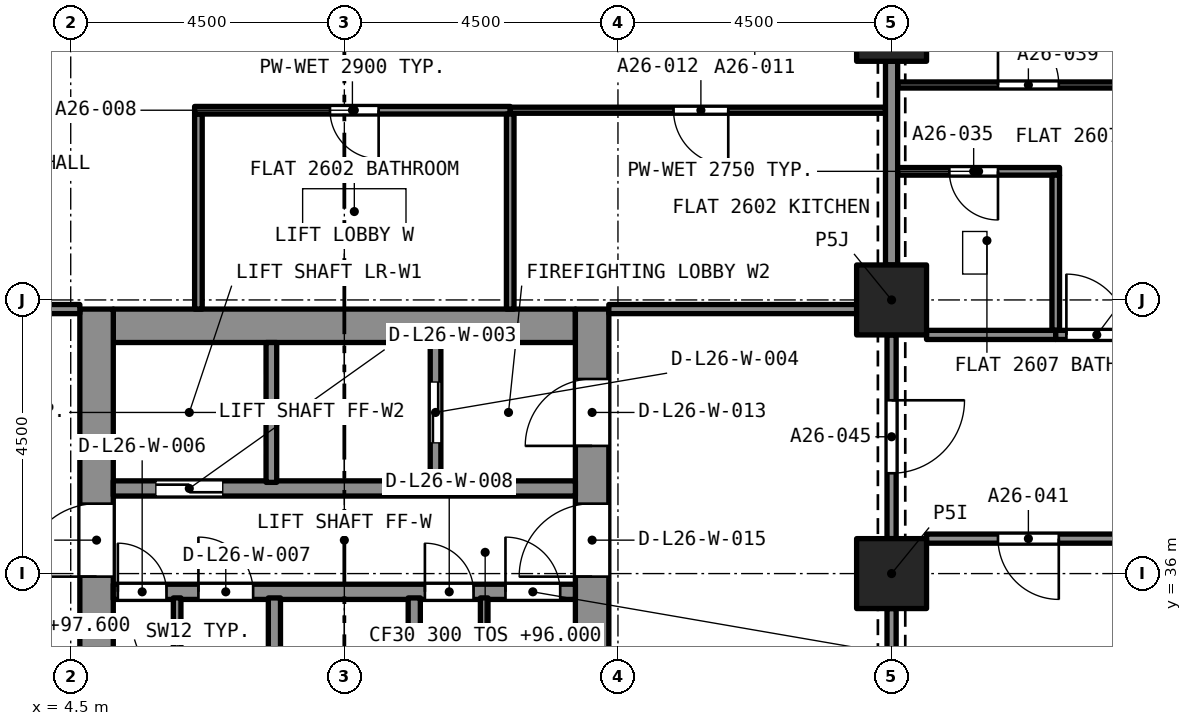
"""IFC4 building model, lengths in metres.
Left out: names, types, materials, properties, quantities, classifications, styles, units other than length and angle.
Written with IfcOpenShell. Run it as: python <this file> out.ifc"""

import sys

from ifc_helpers import new_model, si_unit, direction, frame, frame_2d, origin, origin_2d, place, context, subcontext, project, spatial, rectangle, extrude, element, fill, save


model = new_model("IFC4")
c1 = context("Model", 3, precision=1e-05, world=origin(), true_north=direction((0.0, 1.0)))
c2 = subcontext(c1, "Body", "Model", "MODEL_VIEW")
j1 = project(units=[si_unit("LENGTHUNIT", "METRE"), si_unit("PLANEANGLEUNIT", "RADIAN")], contexts=[c1])
p1 = place(None, origin())
s1 = spatial("IfcSite", under=j1, at=p1, CompositionType="ELEMENT")
p2 = place(p1, origin())
s2 = spatial("IfcBuilding", under=s1, at=p2, CompositionType="ELEMENT")
p3 = place(p2, frame((0.0, 0.0, 96.0)))
s3 = spatial("IfcBuildingStorey", under=s2, at=p3, CompositionType="ELEMENT", Elevation=96.0)
for number, where, z_axis, x_axis in (
    (1, (18.0, 36.0, 0.0), (0.0, 0.0, 1.0), (1.0, 0.0, 0.0)),
    (2, (18.0, 40.5, 0.0), (0.0, 0.0, 1.0), (1.0, 0.0, 0.0)),
    (3, (18.0, 45.0, 0.0), (0.0, 0.0, 1.0), (1.0, 0.0, 0.0)),
):
    element("IfcColumn", number, at=place(p3, frame(where, z_axis=z_axis, x_axis=x_axis)), inside=s3, PredefinedType="COLUMN", context=c2, shape_type="SweptSolid", body=[
        extrude(rectangle(XDim=1.15, YDim=1.15, at=origin_2d()), origin(), (0.0, 0.0, 1.0), 3.2),
    ])
p4 = place(p3, frame((5.2, 40.075, 0.0), z_axis=(0.0, 0.0, 1.0), x_axis=(1.0, 0.0, 0.0)))
e4 = element("IfcWall", 4, at=p4, inside=s3, PredefinedType="SOLIDWALL", context=c2, shape_type="SweptSolid", body=[
    extrude(rectangle(XDim=7.6, YDim=0.55, at=frame_2d((3.8, 0.0))), origin(), (0.0, 0.0, 1.0), 3.2),
])
p5 = place(p3, frame((4.925, 27.15, 0.0), z_axis=(0.0, 0.0, 1.0), x_axis=(0.0, 1.0, 0.0)))
e5 = element("IfcWall", 5, at=p5, inside=s3, PredefinedType="SOLIDWALL", context=c2, shape_type="SweptSolid", body=[
    extrude(rectangle(XDim=13.2, YDim=0.55, at=frame_2d((6.6, 0.0))), origin(), (0.0, 0.0, 1.0), 3.2),
])
p6 = place(p5, frame((8.8, 0.0, 0.0)))
e6 = element("IfcOpeningElement", 6, at=p6, cuts=e5, PredefinedType="OPENING", context=c2, shape_type="SweptSolid", body=[
    extrude(rectangle(XDim=1.2, YDim=2.1, at=frame_2d((0.6, 1.05))), frame((0.0, 0.285, 0.0), z_axis=(0.0, -1.0, 0.0), x_axis=(1.0, 0.0, 0.0)), (0.0, 0.0, 1.0), 0.57),
])
p7 = place(p3, frame((13.075, 27.15, 0.0), z_axis=(0.0, 0.0, 1.0), x_axis=(0.0, 1.0, 0.0)))
e7 = element("IfcWall", 7, at=p7, inside=s3, PredefinedType="SOLIDWALL", context=c2, shape_type="SweptSolid", body=[
    extrude(rectangle(XDim=13.2, YDim=0.55, at=frame_2d((6.6, 0.0))), origin(), (0.0, 0.0, 1.0), 3.2),
])
p8 = place(p7, frame((10.95, 0.0, 0.0)))
e8 = element("IfcOpeningElement", 8, at=p8, cuts=e7, PredefinedType="OPENING", context=c2, shape_type="SweptSolid", body=[
    extrude(rectangle(XDim=1.1, YDim=2.1, at=frame_2d((0.55, 1.05))), frame((0.0, 0.285, 0.0), z_axis=(0.0, -1.0, 0.0), x_axis=(1.0, 0.0, 0.0)), (0.0, 0.0, 1.0), 0.57),
])
p9 = place(p7, frame((8.8, 0.0, 0.0)))
e9 = element("IfcOpeningElement", 9, at=p9, cuts=e7, PredefinedType="OPENING", context=c2, shape_type="SweptSolid", body=[
    extrude(rectangle(XDim=1.2, YDim=2.1, at=frame_2d((0.6, 1.05))), frame((0.0, 0.285, 0.0), z_axis=(0.0, -1.0, 0.0), x_axis=(1.0, 0.0, 0.0)), (0.0, 0.0, 1.0), 0.57),
])
p10 = place(p3, frame((6.6, 40.35, 0.0), z_axis=(0.0, 0.0, 1.0), x_axis=(0.0, 1.0, 0.0)))
e10 = element("IfcWall", 10, at=p10, inside=s3, PredefinedType="PARTITIONING", context=c2, shape_type="SweptSolid", body=[
    extrude(rectangle(XDim=3.208, YDim=0.125, at=frame_2d((1.604, 0.0))), origin(), (0.0, 0.0, 1.0), 2.9),
])
p11 = place(p3, frame((11.728, 43.62, 0.0), z_axis=(0.0, 0.0, 1.0), x_axis=(-1.0, 0.0, 0.0)))
e11 = element("IfcWall", 11, at=p11, inside=s3, PredefinedType="PARTITIONING", context=c2, shape_type="SweptSolid", body=[
    extrude(rectangle(XDim=5.19, YDim=0.125, at=frame_2d((2.595, 0.0))), origin(), (0.0, 0.0, 1.0), 2.9),
])
p12 = place(p11, frame((2.164, 0.0, 0.0)))
e12 = element("IfcOpeningElement", 12, at=p12, cuts=e11, PredefinedType="OPENING", context=c2, shape_type="SweptSolid", body=[
    extrude(rectangle(XDim=0.8, YDim=2.1, at=frame_2d((0.4, 1.05))), frame((0.0, 0.073, 0.0), z_axis=(0.0, -1.0, 0.0), x_axis=(1.0, 0.0, 0.0)), (0.0, 0.0, 1.0), 0.145),
])
p13 = place(p3, frame((11.728, 40.35, 0.0), z_axis=(0.0, 0.0, 1.0), x_axis=(0.0, 1.0, 0.0)))
e13 = element("IfcWall", 13, at=p13, inside=s3, PredefinedType="PARTITIONING", context=c2, shape_type="SweptSolid", body=[
    extrude(rectangle(XDim=3.208, YDim=0.125, at=frame_2d((1.604, 0.0))), origin(), (0.0, 0.0, 1.0), 2.9),
])
p14 = place(p3, frame((17.9, 43.62, 0.0), z_axis=(0.0, 0.0, 1.0), x_axis=(-1.0, 0.0, 0.0)))
e14 = element("IfcWall", 14, at=p14, inside=s3, PredefinedType="PARTITIONING", context=c2, shape_type="SweptSolid", body=[
    extrude(rectangle(XDim=6.172, YDim=0.1, at=frame_2d((3.086, 0.0))), origin(), (0.0, 0.0, 1.0), 2.9),
])
p15 = place(p14, frame((2.586, 0.0, 0.0)))
e15 = element("IfcOpeningElement", 15, at=p15, cuts=e14, PredefinedType="OPENING", context=c2, shape_type="SweptSolid", body=[
    extrude(rectangle(XDim=0.9, YDim=2.1, at=frame_2d((0.45, 1.05))), frame((0.0, 0.06, 0.0), z_axis=(0.0, -1.0, 0.0), x_axis=(1.0, 0.0, 0.0)), (0.0, 0.0, 1.0), 0.12),
])
p16 = place(p3, frame((0.575, 40.35, 0.0), z_axis=(0.0, 0.0, 1.0), x_axis=(1.0, 0.0, 0.0)))
e16 = element("IfcWall", 16, at=p16, inside=s3, PredefinedType="PARTITIONING", context=c2, shape_type="SweptSolid", body=[
    extrude(rectangle(XDim=4.075, YDim=0.15, at=frame_2d((2.038, 0.0))), origin(), (0.0, 0.0, 1.0), 2.9),
])
p17 = place(p16, frame((1.175, 0.0, 0.0)))
e17 = element("IfcOpeningElement", 17, at=p17, cuts=e16, PredefinedType="OPENING", context=c2, shape_type="SweptSolid", body=[
    extrude(rectangle(XDim=1.0, YDim=2.1, at=frame_2d((0.5, 1.05))), frame((0.0, 0.085, 0.0), z_axis=(0.0, -1.0, 0.0), x_axis=(1.0, 0.0, 0.0)), (0.0, 0.0, 1.0), 0.17),
])
p18 = place(p3, frame((18.0, 41.075, 0.0), z_axis=(0.0, 0.0, 1.0), x_axis=(0.0, 1.0, 0.0)))
e18 = element("IfcWall", 18, at=p18, inside=s3, PredefinedType="PARTITIONING", context=c2, shape_type="SweptSolid", body=[
    extrude(rectangle(XDim=3.35, YDim=0.2, at=frame_2d((1.675, 0.0))), origin(), (0.0, 0.0, 1.0), 2.38),
])
p19 = place(p3, frame((13.35, 40.35, 0.0), z_axis=(0.0, 0.0, 1.0), x_axis=(1.0, 0.0, 0.0)))
e19 = element("IfcWall", 19, at=p19, inside=s3, PredefinedType="PARTITIONING", context=c2, shape_type="SweptSolid", body=[
    extrude(rectangle(XDim=4.075, YDim=0.15, at=frame_2d((2.038, 0.0))), origin(), (0.0, 0.0, 1.0), 2.9),
])
p20 = place(p3, frame((20.762, 42.615, 0.0), z_axis=(0.0, 0.0, 1.0), x_axis=(-1.0, 0.0, 0.0)))
e20 = element("IfcWall", 20, at=p20, inside=s3, PredefinedType="PARTITIONING", context=c2, shape_type="SweptSolid", body=[
    extrude(rectangle(XDim=2.662, YDim=0.125, at=frame_2d((1.331, 0.0))), origin(), (0.0, 0.0, 1.0), 2.75),
])
p21 = place(p20, frame((1.012, 0.0, 0.0)))
e21 = element("IfcOpeningElement", 21, at=p21, cuts=e20, PredefinedType="OPENING", context=c2, shape_type="SweptSolid", body=[
    extrude(rectangle(XDim=0.8, YDim=2.1, at=frame_2d((0.4, 1.05))), frame((0.0, 0.073, 0.0), z_axis=(0.0, -1.0, 0.0), x_axis=(1.0, 0.0, 0.0)), (0.0, 0.0, 1.0), 0.145),
])
p22 = place(p3, frame((20.7, 40.0, 0.0), z_axis=(0.0, 0.0, 1.0), x_axis=(0.0, 1.0, 0.0)))
e22 = element("IfcWall", 22, at=p22, inside=s3, PredefinedType="PARTITIONING", context=c2, shape_type="SweptSolid", body=[
    extrude(rectangle(XDim=2.552, YDim=0.125, at=frame_2d((1.276, 0.0))), origin(), (0.0, 0.0, 1.0), 2.75),
])
p23 = place(p3, frame((18.575, 39.925, 0.0), z_axis=(0.0, 0.0, 1.0), x_axis=(1.0, 0.0, 0.0)))
e23 = element("IfcWall", 23, at=p23, inside=s3, PredefinedType="PARTITIONING", context=c2, shape_type="SweptSolid", body=[
    extrude(rectangle(XDim=2.125, YDim=0.15, at=frame_2d((1.062, 0.0))), origin(), (0.0, 0.0, 1.0), 2.75),
])
p24 = place(p3, frame((18.1, 44.035, 0.0), z_axis=(0.0, 0.0, 1.0), x_axis=(1.0, 0.0, 0.0)))
e24 = element("IfcWall", 24, at=p24, inside=s3, PredefinedType="PARTITIONING", context=c2, shape_type="SweptSolid", body=[
    extrude(rectangle(XDim=4.4, YDim=0.1, at=frame_2d((2.2, 0.0))), origin(), (0.0, 0.0, 1.0), 2.75),
])
p25 = place(p24, frame((1.65, 0.0, 0.0)))
e25 = element("IfcOpeningElement", 25, at=p25, cuts=e24, PredefinedType="OPENING", context=c2, shape_type="SweptSolid", body=[
    extrude(rectangle(XDim=1.0, YDim=2.1, at=frame_2d((0.5, 1.05))), frame((0.0, 0.06, 0.0), z_axis=(0.0, -1.0, 0.0), x_axis=(1.0, 0.0, 0.0)), (0.0, 0.0, 1.0), 0.12),
])
p26 = place(p3, frame((20.7, 39.925, 0.0), z_axis=(0.0, 0.0, 1.0), x_axis=(1.0, 0.0, 0.0)))
e26 = element("IfcWall", 26, at=p26, inside=s3, PredefinedType="PARTITIONING", context=c2, shape_type="SweptSolid", body=[
    extrude(rectangle(XDim=1.35, YDim=0.15, at=frame_2d((0.675, 0.0))), origin(), (0.0, 0.0, 1.0), 2.75),
])
p27 = place(p26, frame((0.175, 0.0, 0.0)))
e27 = element("IfcOpeningElement", 27, at=p27, cuts=e26, PredefinedType="OPENING", context=c2, shape_type="SweptSolid", body=[
    extrude(rectangle(XDim=1.0, YDim=2.1, at=frame_2d((0.5, 1.05))), frame((0.0, 0.085, 0.0), z_axis=(0.0, -1.0, 0.0), x_axis=(1.0, 0.0, 0.0)), (0.0, 0.0, 1.0), 0.17),
])
p28 = place(p3, frame((22.5, 36.575, 0.0), z_axis=(0.0, 0.0, 1.0), x_axis=(-1.0, 0.0, 0.0)))
e28 = element("IfcWall", 28, at=p28, inside=s3, PredefinedType="PARTITIONING", context=c2, shape_type="SweptSolid", body=[
    extrude(rectangle(XDim=3.925, YDim=0.15, at=frame_2d((1.962, 0.0))), origin(), (0.0, 0.0, 1.0), 2.75),
])
p29 = place(p28, frame((1.75, 0.0, 0.0)))
e29 = element("IfcOpeningElement", 29, at=p29, cuts=e28, PredefinedType="OPENING", context=c2, shape_type="SweptSolid", body=[
    extrude(rectangle(XDim=1.0, YDim=2.1, at=frame_2d((0.5, 1.05))), frame((0.0, 0.085, 0.0), z_axis=(0.0, -1.0, 0.0), x_axis=(1.0, 0.0, 0.0)), (0.0, 0.0, 1.0), 0.17),
])
p30 = place(p3, frame((18.0, 39.925, 0.0), z_axis=(0.0, 0.0, 1.0), x_axis=(0.0, -1.0, 0.0)))
e30 = element("IfcWall", 30, at=p30, inside=s3, PredefinedType="PARTITIONING", context=c2, shape_type="SweptSolid", body=[
    extrude(rectangle(XDim=3.35, YDim=0.15, at=frame_2d((1.675, 0.0))), origin(), (0.0, 0.0, 1.0), 2.38),
])
p31 = place(p30, frame((1.075, 0.0, 0.0)))
e31 = element("IfcOpeningElement", 31, at=p31, cuts=e30, PredefinedType="OPENING", context=c2, shape_type="SweptSolid", body=[
    extrude(rectangle(XDim=1.2, YDim=2.1, at=frame_2d((0.6, 1.05))), frame((0.0, 0.085, 0.0), z_axis=(0.0, -1.0, 0.0), x_axis=(1.0, 0.0, 0.0)), (0.0, 0.0, 1.0), 0.17),
])
p32 = place(p3, frame((18.0, 32.075, 0.0), z_axis=(0.0, 0.0, 1.0), x_axis=(0.0, 1.0, 0.0)))
e32 = element("IfcWall", 32, at=p32, inside=s3, PredefinedType="PARTITIONING", context=c2, shape_type="SweptSolid", body=[
    extrude(rectangle(XDim=3.35, YDim=0.15, at=frame_2d((1.675, 0.0))), origin(), (0.0, 0.0, 1.0), 2.38),
])
p33 = place(p3, frame((5.2, 35.7, 0.0), z_axis=(0.0, 0.0, 1.0), x_axis=(1.0, 0.0, 0.0)))
e33 = element("IfcWall", 33, at=p33, inside=s3, PredefinedType="SOLIDWALL", context=c2, shape_type="SweptSolid", body=[
    extrude(rectangle(XDim=7.6, YDim=0.25, at=frame_2d((3.8, 0.0))), origin(), (0.0, 0.0, 1.0), 2.9),
])
p34 = place(p33, frame((0.075, 0.0, 0.0)))
e34 = element("IfcOpeningElement", 34, at=p34, cuts=e33, PredefinedType="OPENING", context=c2, shape_type="SweptSolid", body=[
    extrude(rectangle(XDim=0.8, YDim=2.1, at=frame_2d((0.4, 1.05))), frame((0.0, 0.135, 0.0), z_axis=(0.0, -1.0, 0.0), x_axis=(1.0, 0.0, 0.0)), (0.0, 0.0, 1.0), 0.27),
])
p35 = place(p33, frame((1.4, 0.0, 0.0)))
e35 = element("IfcOpeningElement", 35, at=p35, cuts=e33, PredefinedType="OPENING", context=c2, shape_type="SweptSolid", body=[
    extrude(rectangle(XDim=0.9, YDim=2.1, at=frame_2d((0.45, 1.05))), frame((0.0, 0.135, 0.0), z_axis=(0.0, -1.0, 0.0), x_axis=(1.0, 0.0, 0.0)), (0.0, 0.0, 1.0), 0.27),
])
p36 = place(p33, frame((5.125, 0.0, 0.0)))
e36 = element("IfcOpeningElement", 36, at=p36, cuts=e33, PredefinedType="OPENING", context=c2, shape_type="SweptSolid", body=[
    extrude(rectangle(XDim=0.8, YDim=2.1, at=frame_2d((0.4, 1.05))), frame((0.0, 0.135, 0.0), z_axis=(0.0, -1.0, 0.0), x_axis=(1.0, 0.0, 0.0)), (0.0, 0.0, 1.0), 0.27),
])
p37 = place(p33, frame((6.45, 0.0, 0.0)))
e37 = element("IfcOpeningElement", 37, at=p37, cuts=e33, PredefinedType="OPENING", context=c2, shape_type="SweptSolid", body=[
    extrude(rectangle(XDim=0.9, YDim=2.1, at=frame_2d((0.45, 1.05))), frame((0.0, 0.135, 0.0), z_axis=(0.0, -1.0, 0.0), x_axis=(1.0, 0.0, 0.0)), (0.0, 0.0, 1.0), 0.27),
])
p38 = place(p3, frame((5.2, 37.4, 0.0), z_axis=(0.0, 0.0, 1.0), x_axis=(1.0, 0.0, 0.0)))
e38 = element("IfcWall", 38, at=p38, inside=s3, PredefinedType="SOLIDWALL", context=c2, shape_type="SweptSolid", body=[
    extrude(rectangle(XDim=7.6, YDim=0.25, at=frame_2d((3.8, 0.0))), origin(), (0.0, 0.0, 1.0), 2.9),
])
p39 = place(p38, frame((0.7, 0.0, 0.0)))
e39 = element("IfcOpeningElement", 39, at=p39, cuts=e38, PredefinedType="OPENING", context=c2, shape_type="SweptSolid", body=[
    extrude(rectangle(XDim=1.1, YDim=2.4, at=frame_2d((0.55, 1.2))), frame((0.0, 0.135, 0.0), z_axis=(0.0, -1.0, 0.0), x_axis=(1.0, 0.0, 0.0)), (0.0, 0.0, 1.0), 0.27),
])
for number, where, z_axis, x_axis in (
    (40, (7.85, 33.3, 0.0), (0.0, 0.0, 1.0), (0.0, 1.0, 0.0)),
    (41, (10.15, 33.3, 0.0), (0.0, 0.0, 1.0), (0.0, 1.0, 0.0)),
):
    element("IfcWall", number, at=place(p3, frame(where, z_axis=z_axis, x_axis=x_axis)), inside=s3, PredefinedType="SOLIDWALL", context=c2, shape_type="SweptSolid", body=[
        extrude(rectangle(XDim=2.3, YDim=0.2, at=frame_2d((1.15, 0.0))), origin(), (0.0, 0.0, 1.0), 2.9),
    ])
p40 = place(p3, frame((7.8, 37.5, 0.0), z_axis=(0.0, 0.0, 1.0), x_axis=(0.0, 1.0, 0.0)))
e42 = element("IfcWall", 42, at=p40, inside=s3, PredefinedType="SOLIDWALL", context=c2, shape_type="SweptSolid", body=[
    extrude(rectangle(XDim=2.3, YDim=0.175, at=frame_2d((1.15, 0.0))), origin(), (0.0, 0.0, 1.0), 2.9),
])
p41 = place(p3, frame((10.5, 37.5, 0.0), z_axis=(0.0, 0.0, 1.0), x_axis=(0.0, 1.0, 0.0)))
e43 = element("IfcWall", 43, at=p41, inside=s3, PredefinedType="SOLIDWALL", context=c2, shape_type="SweptSolid", body=[
    extrude(rectangle(XDim=2.3, YDim=0.175, at=frame_2d((1.15, 0.0))), origin(), (0.0, 0.0, 1.0), 2.9),
])
p42 = place(p41, frame((0.65, 0.0, 0.0)))
e44 = element("IfcOpeningElement", 44, at=p42, cuts=e43, PredefinedType="OPENING", context=c2, shape_type="SweptSolid", body=[
    extrude(rectangle(XDim=1.0, YDim=2.1, at=frame_2d((0.5, 1.05))), frame((0.0, 0.097, 0.0), z_axis=(0.0, -1.0, 0.0), x_axis=(1.0, 0.0, 0.0)), (0.0, 0.0, 1.0), 0.195),
])
for number, where, z_axis, x_axis in (
    (45, (6.25, 33.3, 0.0), (0.0, 0.0, 1.0), (0.0, 1.0, 0.0)),
    (46, (11.3, 33.3, 0.0), (0.0, 0.0, 1.0), (0.0, 1.0, 0.0)),
):
    element("IfcWall", number, at=place(p3, frame(where, z_axis=z_axis, x_axis=x_axis)), inside=s3, PredefinedType="PARTITIONING", context=c2, shape_type="SweptSolid", body=[
        extrude(rectangle(XDim=2.3, YDim=0.125, at=frame_2d((1.15, 0.0))), origin(), (0.0, 0.0, 1.0), 2.9),
    ])
p43 = place(p12, origin())
e47 = element("IfcDoor", 47, at=p43, inside=s3, OperationType="SINGLE_SWING_LEFT", PredefinedType="DOOR", context=c2, shape_type="SweptSolid", body=[
    extrude(rectangle(XDim=0.8, YDim=2.1, at=frame_2d((0.4, 1.05))), frame((0.0, 0.025, 0.0), z_axis=(0.0, -1.0, 0.0), x_axis=(1.0, 0.0, 0.0)), (0.0, 0.0, 1.0), 0.05),
])
fill(e12, e47)
p44 = place(p15, origin())
e48 = element("IfcDoor", 48, at=p44, inside=s3, OperationType="SINGLE_SWING_LEFT", PredefinedType="DOOR", context=c2, shape_type="SweptSolid", body=[
    extrude(rectangle(XDim=0.9, YDim=2.1, at=frame_2d((0.45, 1.05))), frame((0.0, 0.025, 0.0), z_axis=(0.0, -1.0, 0.0), x_axis=(1.0, 0.0, 0.0)), (0.0, 0.0, 1.0), 0.05),
])
fill(e15, e48)
p45 = place(p21, origin())
e49 = element("IfcDoor", 49, at=p45, inside=s3, OperationType="SINGLE_SWING_RIGHT", PredefinedType="DOOR", context=c2, shape_type="SweptSolid", body=[
    extrude(rectangle(XDim=0.8, YDim=2.1, at=frame_2d((0.4, 1.05))), frame((0.0, 0.025, 0.0), z_axis=(0.0, -1.0, 0.0), x_axis=(1.0, 0.0, 0.0)), (0.0, 0.0, 1.0), 0.05),
])
fill(e21, e49)
p46 = place(p25, origin())
e50 = element("IfcDoor", 50, at=p46, inside=s3, OperationType="SINGLE_SWING_LEFT", PredefinedType="DOOR", context=c2, shape_type="SweptSolid", body=[
    extrude(rectangle(XDim=1.0, YDim=2.1, at=frame_2d((0.5, 1.05))), frame((0.0, 0.025, 0.0), z_axis=(0.0, -1.0, 0.0), x_axis=(1.0, 0.0, 0.0)), (0.0, 0.0, 1.0), 0.05),
])
fill(e25, e50)
p47 = place(p27, origin())
e51 = element("IfcDoor", 51, at=p47, inside=s3, OperationType="SINGLE_SWING_RIGHT", PredefinedType="DOOR", context=c2, shape_type="SweptSolid", body=[
    extrude(rectangle(XDim=1.0, YDim=2.1, at=frame_2d((0.5, 1.05))), frame((0.0, 0.025, 0.0), z_axis=(0.0, -1.0, 0.0), x_axis=(1.0, 0.0, 0.0)), (0.0, 0.0, 1.0), 0.05),
])
fill(e27, e51)
p48 = place(p29, origin())
e52 = element("IfcDoor", 52, at=p48, inside=s3, OperationType="SINGLE_SWING_RIGHT", PredefinedType="DOOR", context=c2, shape_type="SweptSolid", body=[
    extrude(rectangle(XDim=1.0, YDim=2.1, at=frame_2d((0.5, 1.05))), frame((0.0, 0.025, 0.0), z_axis=(0.0, -1.0, 0.0), x_axis=(1.0, 0.0, 0.0)), (0.0, 0.0, 1.0), 0.05),
])
fill(e29, e52)
p49 = place(p31, origin())
e53 = element("IfcDoor", 53, at=p49, inside=s3, OperationType="SINGLE_SWING_LEFT", PredefinedType="DOOR", context=c2, shape_type="SweptSolid", body=[
    extrude(rectangle(XDim=1.2, YDim=2.1, at=frame_2d((0.6, 1.05))), frame((0.0, 0.025, 0.0), z_axis=(0.0, -1.0, 0.0), x_axis=(1.0, 0.0, 0.0)), (0.0, 0.0, 1.0), 0.05),
])
fill(e31, e53)
p50 = place(p39, origin())
e54 = element("IfcDoor", 54, at=p50, inside=s3, OperationType="SLIDING_TO_LEFT", PredefinedType="DOOR", context=c2, shape_type="SweptSolid", body=[
    extrude(rectangle(XDim=1.1, YDim=2.4, at=frame_2d((0.55, 1.2))), frame((0.0, 0.025, 0.0), z_axis=(0.0, -1.0, 0.0), x_axis=(1.0, 0.0, 0.0)), (0.0, 0.0, 1.0), 0.05),
])
fill(e39, e54)
p51 = place(p42, origin())
e55 = element("IfcDoor", 55, at=p51, inside=s3, OperationType="SLIDING_TO_LEFT", PredefinedType="DOOR", context=c2, shape_type="SweptSolid", body=[
    extrude(rectangle(XDim=1.0, YDim=2.1, at=frame_2d((0.5, 1.05))), frame((0.0, 0.025, 0.0), z_axis=(0.0, -1.0, 0.0), x_axis=(1.0, 0.0, 0.0)), (0.0, 0.0, 1.0), 0.05),
])
fill(e44, e55)
p52 = place(p34, origin())
e56 = element("IfcDoor", 56, at=p52, inside=s3, OperationType="SINGLE_SWING_LEFT", PredefinedType="DOOR", context=c2, shape_type="SweptSolid", body=[
    extrude(rectangle(XDim=0.8, YDim=2.1, at=frame_2d((0.4, 1.05))), frame((0.0, 0.025, 0.0), z_axis=(0.0, -1.0, 0.0), x_axis=(1.0, 0.0, 0.0)), (0.0, 0.0, 1.0), 0.05),
])
fill(e34, e56)
p53 = place(p35, origin())
e57 = element("IfcDoor", 57, at=p53, inside=s3, OperationType="SINGLE_SWING_LEFT", PredefinedType="DOOR", context=c2, shape_type="SweptSolid", body=[
    extrude(rectangle(XDim=0.9, YDim=2.1, at=frame_2d((0.45, 1.05))), frame((0.0, 0.025, 0.0), z_axis=(0.0, -1.0, 0.0), x_axis=(1.0, 0.0, 0.0)), (0.0, 0.0, 1.0), 0.05),
])
fill(e35, e57)
p54 = place(p36, origin())
e58 = element("IfcDoor", 58, at=p54, inside=s3, OperationType="SINGLE_SWING_LEFT", PredefinedType="DOOR", context=c2, shape_type="SweptSolid", body=[
    extrude(rectangle(XDim=0.8, YDim=2.1, at=frame_2d((0.4, 1.05))), frame((0.0, 0.025, 0.0), z_axis=(0.0, -1.0, 0.0), x_axis=(1.0, 0.0, 0.0)), (0.0, 0.0, 1.0), 0.05),
])
fill(e36, e58)
p55 = place(p37, origin())
e59 = element("IfcDoor", 59, at=p55, inside=s3, OperationType="SINGLE_SWING_LEFT", PredefinedType="DOOR", context=c2, shape_type="SweptSolid", body=[
    extrude(rectangle(XDim=0.9, YDim=2.1, at=frame_2d((0.45, 1.05))), frame((0.0, 0.025, 0.0), z_axis=(0.0, -1.0, 0.0), x_axis=(1.0, 0.0, 0.0)), (0.0, 0.0, 1.0), 0.05),
])
fill(e37, e59)
p56 = place(p8, origin())
e60 = element("IfcDoor", 60, at=p56, inside=s3, OperationType="SINGLE_SWING_LEFT", PredefinedType="DOOR", context=c2, shape_type="SweptSolid", body=[
    extrude(rectangle(XDim=1.1, YDim=2.1, at=frame_2d((0.55, 1.05))), frame((0.0, 0.025, 0.0), z_axis=(0.0, -1.0, 0.0), x_axis=(1.0, 0.0, 0.0)), (0.0, 0.0, 1.0), 0.05),
])
fill(e8, e60)
p57 = place(p6, origin())
e61 = element("IfcDoor", 61, at=p57, inside=s3, OperationType="SINGLE_SWING_LEFT", PredefinedType="DOOR", context=c2, shape_type="SweptSolid", body=[
    extrude(rectangle(XDim=1.2, YDim=2.1, at=frame_2d((0.6, 1.05))), frame((0.0, 0.025, 0.0), z_axis=(0.0, -1.0, 0.0), x_axis=(1.0, 0.0, 0.0)), (0.0, 0.0, 1.0), 0.05),
])
fill(e6, e61)
p58 = place(p9, origin())
e62 = element("IfcDoor", 62, at=p58, inside=s3, OperationType="SINGLE_SWING_LEFT", PredefinedType="DOOR", context=c2, shape_type="SweptSolid", body=[
    extrude(rectangle(XDim=1.2, YDim=2.1, at=frame_2d((0.6, 1.05))), frame((0.0, 0.025, 0.0), z_axis=(0.0, -1.0, 0.0), x_axis=(1.0, 0.0, 0.0)), (0.0, 0.0, 1.0), 0.05),
])
fill(e9, e62)
save(model, sys.argv[1])
